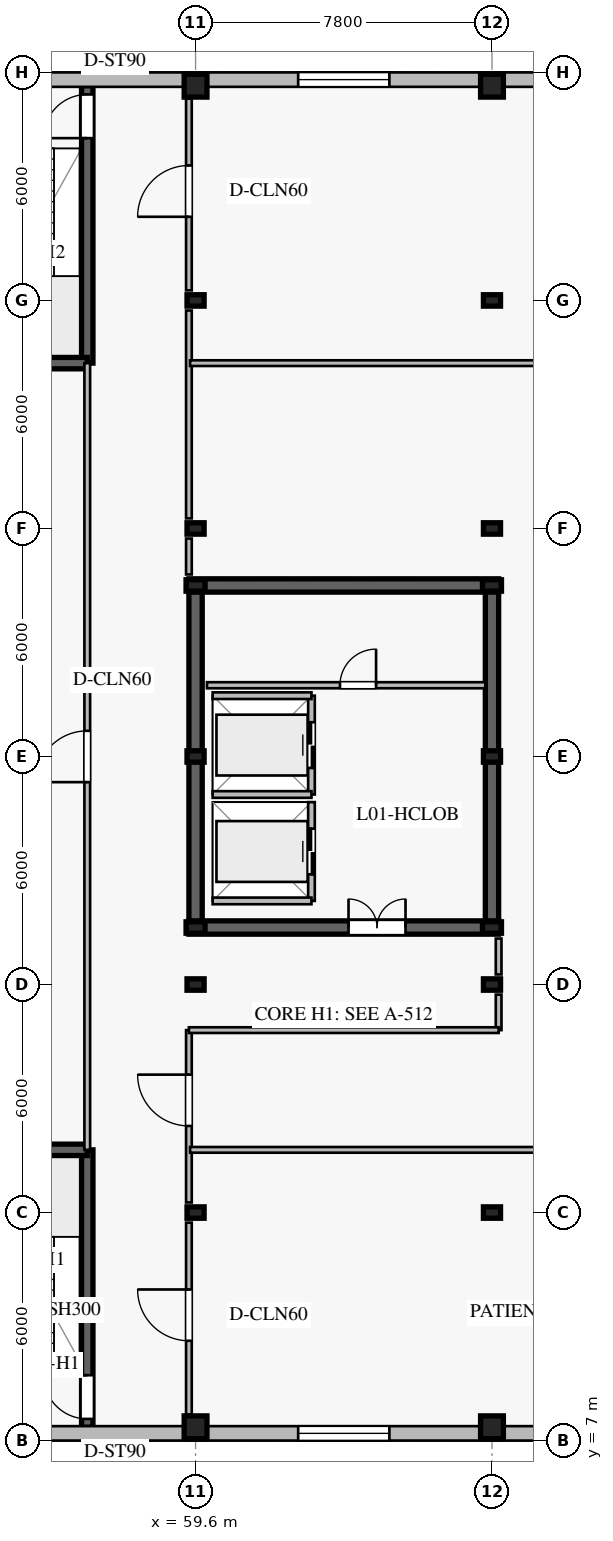
"""IFC4 building model, lengths in metres.
Left out: names, types, materials, properties, quantities, classifications, styles, units other than length and angle.
Written with IfcOpenShell. Run it as: python <this file> out.ifc"""

import sys

from ifc_helpers import new_model, si_unit, direction, frame, frame_2d, origin, origin_2d, place, context, subcontext, project, spatial, rectangle, i_section, extrude, element, fill, save


model = new_model("IFC4")
c1 = context("Model", 3, precision=1e-05, world=origin(), true_north=direction((0.0, 1.0)))
c2 = subcontext(c1, "Body", "Model", "MODEL_VIEW")
j1 = project(units=[si_unit("LENGTHUNIT", "METRE"), si_unit("PLANEANGLEUNIT", "RADIAN")], contexts=[c1])
p1 = place(None, origin())
s1 = spatial("IfcSite", under=j1, at=p1, CompositionType="ELEMENT")
p2 = place(p1, origin())
s2 = spatial("IfcBuilding", under=s1, at=p2, CompositionType="ELEMENT")
p3 = place(p2, frame((0.0, 0.0, 5.2)))
s3 = spatial("IfcBuildingStorey", under=s2, at=p3, CompositionType="ELEMENT", Elevation=5.2)
p4 = place(p3, frame((59.425, 20.5, 0.0), z_axis=(0.0, 0.0, 1.0), x_axis=(1.0, 0.0, 0.0)))
e1 = element("IfcWall", 1, at=p4, inside=s3, PredefinedType="SHEAR", context=c2, shape_type="SweptSolid", body=[
    extrude(rectangle(XDim=8.15, YDim=0.35, at=frame_2d((4.075, 0.0))), origin(), (0.0, 0.0, 1.0), 4.34),
])
p5 = place(p4, frame((4.2, 0.0, 0.0)))
e2 = element("IfcOpeningElement", 2, at=p5, cuts=e1, PredefinedType="OPENING", context=c2, shape_type="SweptSolid", body=[
    extrude(rectangle(XDim=1.5, YDim=2.2, at=frame_2d((0.75, 1.1))), frame((0.0, 0.185, 0.0), z_axis=(0.0, -1.0, 0.0), x_axis=(1.0, 0.0, 0.0)), (0.0, 0.0, 1.0), 0.37),
])
p6 = place(p3, frame((67.575, 29.5, 0.0), z_axis=(0.0, 0.0, 1.0), x_axis=(-1.0, 0.0, 0.0)))
e3 = element("IfcWall", 3, at=p6, inside=s3, PredefinedType="SHEAR", context=c2, shape_type="SweptSolid", body=[
    extrude(rectangle(XDim=8.15, YDim=0.35, at=frame_2d((4.075, 0.0))), origin(), (0.0, 0.0, 1.0), 4.34),
])
for number, where, z_axis, x_axis in (
    (4, (59.6, 29.325, 0.0), (0.0, 0.0, 1.0), (0.0, -1.0, 0.0)),
    (5, (67.4, 20.675, 0.0), (0.0, 0.0, 1.0), (0.0, 1.0, 0.0)),
):
    element("IfcWall", number, at=place(p3, frame(where, z_axis=z_axis, x_axis=x_axis)), inside=s3, PredefinedType="SHEAR", context=c2, shape_type="SweptSolid", body=[
        extrude(rectangle(XDim=8.65, YDim=0.35, at=frame_2d((4.325, 0.0))), origin(), (0.0, 0.0, 1.0), 4.34),
    ])
for number, where, z_axis, x_axis in (
    (6, (59.6, 20.5, 0.0), (0.0, 0.0, 1.0), (1.0, 0.0, 0.0)),
    (7, (67.4, 20.5, 0.0), (0.0, 0.0, 1.0), (1.0, 0.0, 0.0)),
    (8, (67.4, 29.5, 0.0), (0.0, 0.0, 1.0), (1.0, 0.0, 0.0)),
    (9, (59.6, 29.5, 0.0), (0.0, 0.0, 1.0), (1.0, 0.0, 0.0)),
):
    element("IfcColumn", number, at=place(p3, frame(where, z_axis=z_axis, x_axis=x_axis)), inside=s3, PredefinedType="COLUMN", context=c2, shape_type="SweptSolid", body=[
        extrude(i_section(OverallWidth=0.3, OverallDepth=0.5, WebThickness=0.014, FlangeThickness=0.028, at=origin_2d()), origin(), (0.0, 0.0, 1.0), 4.6),
    ])
p7 = place(p3, frame((56.75, 7.35, 0.0), z_axis=(0.0, 0.0, 1.0), x_axis=(0.0, 1.0, 0.0)))
e10 = element("IfcWall", 10, at=p7, inside=s3, PredefinedType="SOLIDWALL", context=c2, shape_type="SweptSolid", body=[
    extrude(rectangle(XDim=7.3, YDim=0.3, at=frame_2d((3.65, 0.0))), origin(), (0.0, 0.0, 1.0), 4.34),
])
p8 = place(p7, frame((0.22, 0.0, 0.0)))
e11 = element("IfcOpeningElement", 11, at=p8, cuts=e10, PredefinedType="OPENING", context=c2, shape_type="SweptSolid", body=[
    extrude(rectangle(XDim=1.15, YDim=2.2, at=frame_2d((0.575, 1.1))), frame((0.0, 0.16, 0.0), z_axis=(0.0, -1.0, 0.0), x_axis=(1.0, 0.0, 0.0)), (0.0, 0.0, 1.0), 0.32),
])
p9 = place(p3, frame((53.4, 14.65, 0.0), z_axis=(0.0, 0.0, 1.0), x_axis=(1.0, 0.0, 0.0)))
e12 = element("IfcWall", 12, at=p9, inside=s3, PredefinedType="SOLIDWALL", context=c2, shape_type="SweptSolid", body=[
    extrude(rectangle(XDim=3.35, YDim=0.3, at=frame_2d((1.675, 0.0))), origin(), (0.0, 0.0, 1.0), 4.34),
])
p10 = place(p3, frame((56.75, 35.35, 0.0), z_axis=(0.0, 0.0, 1.0), x_axis=(0.0, 1.0, 0.0)))
e13 = element("IfcWall", 13, at=p10, inside=s3, PredefinedType="SOLIDWALL", context=c2, shape_type="SweptSolid", body=[
    extrude(rectangle(XDim=7.3, YDim=0.3, at=frame_2d((3.65, 0.0))), origin(), (0.0, 0.0, 1.0), 4.34),
])
p11 = place(p10, frame((5.92, 0.0, 0.0)))
e14 = element("IfcOpeningElement", 14, at=p11, cuts=e13, PredefinedType="OPENING", context=c2, shape_type="SweptSolid", body=[
    extrude(rectangle(XDim=1.15, YDim=2.2, at=frame_2d((0.575, 1.1))), frame((0.0, 0.16, 0.0), z_axis=(0.0, -1.0, 0.0), x_axis=(1.0, 0.0, 0.0)), (0.0, 0.0, 1.0), 0.32),
])
p12 = place(p3, frame((53.4, 35.35, 0.0), z_axis=(0.0, 0.0, 1.0), x_axis=(1.0, 0.0, 0.0)))
e15 = element("IfcWall", 15, at=p12, inside=s3, PredefinedType="SOLIDWALL", context=c2, shape_type="SweptSolid", body=[
    extrude(rectangle(XDim=3.35, YDim=0.3, at=frame_2d((1.675, 0.0))), origin(), (0.0, 0.0, 1.0), 4.34),
])
p13 = place(p3, frame((59.6, 7.35, 0.0), z_axis=(0.0, 0.0, 1.0), x_axis=(1.0, 0.0, 0.0)))
e16 = element("IfcColumn", 16, at=p13, inside=s3, PredefinedType="COLUMN", context=c2, shape_type="SweptSolid", body=[
    extrude(rectangle(XDim=0.6, YDim=0.6, at=origin_2d()), origin(), (0.0, 0.0, 1.0), 4.6),
])
for number, where, z_axis, x_axis in (
    (17, (59.6, 13.0, 0.0), (0.0, 0.0, 1.0), (1.0, 0.0, 0.0)),
    (18, (59.6, 19.0, 0.0), (0.0, 0.0, 1.0), (1.0, 0.0, 0.0)),
    (19, (59.6, 25.0, 0.0), (0.0, 0.0, 1.0), (1.0, 0.0, 0.0)),
    (20, (59.6, 31.0, 0.0), (0.0, 0.0, 1.0), (1.0, 0.0, 0.0)),
    (21, (59.6, 37.0, 0.0), (0.0, 0.0, 1.0), (1.0, 0.0, 0.0)),
):
    element("IfcColumn", number, at=place(p3, frame(where, z_axis=z_axis, x_axis=x_axis)), inside=s3, PredefinedType="COLUMN", context=c2, shape_type="SweptSolid", body=[
        extrude(i_section(OverallWidth=0.3, OverallDepth=0.45, WebThickness=0.014, FlangeThickness=0.026, at=origin_2d()), origin(), (0.0, 0.0, 1.0), 4.6),
    ])
for number, where, z_axis, x_axis in (
    (22, (59.6, 42.65, 0.0), (0.0, 0.0, 1.0), (1.0, 0.0, 0.0)),
    (23, (67.4, 7.35, 0.0), (0.0, 0.0, 1.0), (1.0, 0.0, 0.0)),
):
    element("IfcColumn", number, at=place(p3, frame(where, z_axis=z_axis, x_axis=x_axis)), inside=s3, PredefinedType="COLUMN", context=c2, shape_type="SweptSolid", body=[
        extrude(rectangle(XDim=0.6, YDim=0.6, at=origin_2d()), origin(), (0.0, 0.0, 1.0), 4.6),
    ])
for number, where, z_axis, x_axis in (
    (24, (67.4, 13.0, 0.0), (0.0, 0.0, 1.0), (1.0, 0.0, 0.0)),
    (25, (67.4, 19.0, 0.0), (0.0, 0.0, 1.0), (1.0, 0.0, 0.0)),
    (26, (67.4, 25.0, 0.0), (0.0, 0.0, 1.0), (1.0, 0.0, 0.0)),
    (27, (67.4, 31.0, 0.0), (0.0, 0.0, 1.0), (1.0, 0.0, 0.0)),
    (28, (67.4, 37.0, 0.0), (0.0, 0.0, 1.0), (1.0, 0.0, 0.0)),
):
    element("IfcColumn", number, at=place(p3, frame(where, z_axis=z_axis, x_axis=x_axis)), inside=s3, PredefinedType="COLUMN", context=c2, shape_type="SweptSolid", body=[
        extrude(i_section(OverallWidth=0.3, OverallDepth=0.45, WebThickness=0.014, FlangeThickness=0.026, at=origin_2d()), origin(), (0.0, 0.0, 1.0), 4.6),
    ])
p14 = place(p3, frame((67.4, 42.65, 0.0), z_axis=(0.0, 0.0, 1.0), x_axis=(1.0, 0.0, 0.0)))
e29 = element("IfcColumn", 29, at=p14, inside=s3, PredefinedType="COLUMN", context=c2, shape_type="SweptSolid", body=[
    extrude(rectangle(XDim=0.6, YDim=0.6, at=origin_2d()), origin(), (0.0, 0.0, 1.0), 4.6),
])
p15 = place(p3, frame((75.0, 7.19, 0.0), z_axis=(0.0, 0.0, 1.0), x_axis=(-1.0, 0.0, 0.0)))
e30 = element("IfcWall", 30, at=p15, inside=s3, PredefinedType="STANDARD", context=c2, shape_type="SweptSolid", body=[
    extrude(rectangle(XDim=23.0, YDim=0.38, at=frame_2d((11.5, 0.0))), origin(), (0.0, 0.0, 1.0), 4.34),
])
p16 = place(p15, frame((10.3, 0.0, 0.95)))
e31 = element("IfcOpeningElement", 31, at=p16, cuts=e30, PredefinedType="OPENING", context=c2, shape_type="SweptSolid", body=[
    extrude(rectangle(XDim=2.4, YDim=1.8, at=frame_2d((1.2, 0.9))), frame((0.0, 0.2, 0.0), z_axis=(0.0, -1.0, 0.0), x_axis=(1.0, 0.0, 0.0)), (0.0, 0.0, 1.0), 0.4),
])
p17 = place(p3, frame((52.0, 42.81, 0.0), z_axis=(0.0, 0.0, 1.0), x_axis=(1.0, 0.0, 0.0)))
e32 = element("IfcWall", 32, at=p17, inside=s3, PredefinedType="STANDARD", context=c2, shape_type="SweptSolid", body=[
    extrude(rectangle(XDim=23.0, YDim=0.38, at=frame_2d((11.5, 0.0))), origin(), (0.0, 0.0, 1.0), 4.34),
])
p18 = place(p17, frame((10.3, 0.0, 0.95)))
e33 = element("IfcOpeningElement", 33, at=p18, cuts=e32, PredefinedType="OPENING", context=c2, shape_type="SweptSolid", body=[
    extrude(rectangle(XDim=2.4, YDim=1.8, at=frame_2d((1.2, 0.9))), frame((0.0, 0.2, 0.0), z_axis=(0.0, -1.0, 0.0), x_axis=(1.0, 0.0, 0.0)), (0.0, 0.0, 1.0), 0.4),
])
p19 = place(p3, frame((62.65, 21.2, 0.0), z_axis=(0.0, 0.0, 1.0), x_axis=(0.0, 1.0, 0.0)))
e34 = element("IfcWall", 34, at=p19, inside=s3, PredefinedType="PARTITIONING", context=c2, shape_type="SweptSolid", body=[
    extrude(rectangle(XDim=2.6, YDim=0.175, at=frame_2d((1.3, 0.0))), origin(), (0.0, 0.0, 1.0), 4.34),
])
p20 = place(p19, frame((0.7, 0.0, 0.0)))
e35 = element("IfcOpeningElement", 35, at=p20, cuts=e34, PredefinedType="OPENING", context=c2, shape_type="SweptSolid", body=[
    extrude(rectangle(XDim=1.2, YDim=2.2, at=frame_2d((0.6, 1.1))), frame((0.0, 0.098, 0.0), z_axis=(0.0, -1.0, 0.0), x_axis=(1.0, 0.0, 0.0)), (0.0, 0.0, 1.0), 0.195),
])
p21 = place(p3, frame((60.05, 21.2, 0.0), z_axis=(0.0, 0.0, 1.0), x_axis=(1.0, 0.0, 0.0)))
e36 = element("IfcWall", 36, at=p21, inside=s3, PredefinedType="PARTITIONING", context=c2, shape_type="SweptSolid", body=[
    extrude(rectangle(XDim=2.6, YDim=0.175, at=frame_2d((1.3, 0.0))), origin(), (0.0, 0.0, 1.0), 4.34),
])
p22 = place(p3, frame((62.65, 24.0, 0.0), z_axis=(0.0, 0.0, 1.0), x_axis=(0.0, 1.0, 0.0)))
e37 = element("IfcWall", 37, at=p22, inside=s3, PredefinedType="PARTITIONING", context=c2, shape_type="SweptSolid", body=[
    extrude(rectangle(XDim=2.6, YDim=0.175, at=frame_2d((1.3, 0.0))), origin(), (0.0, 0.0, 1.0), 3.98),
])
p23 = place(p22, frame((0.7, 0.0, 0.0)))
e38 = element("IfcOpeningElement", 38, at=p23, cuts=e37, PredefinedType="OPENING", context=c2, shape_type="SweptSolid", body=[
    extrude(rectangle(XDim=1.2, YDim=2.2, at=frame_2d((0.6, 1.1))), frame((0.0, 0.098, 0.0), z_axis=(0.0, -1.0, 0.0), x_axis=(1.0, 0.0, 0.0)), (0.0, 0.0, 1.0), 0.195),
])
for number, where, z_axis, x_axis in (
    (39, (60.05, 24.0, 0.0), (0.0, 0.0, 1.0), (1.0, 0.0, 0.0)),
    (40, (60.05, 26.6, 0.0), (0.0, 0.0, 1.0), (1.0, 0.0, 0.0)),
):
    element("IfcWall", number, at=place(p3, frame(where, z_axis=z_axis, x_axis=x_axis)), inside=s3, PredefinedType="PARTITIONING", context=c2, shape_type="SweptSolid", body=[
        extrude(rectangle(XDim=2.6, YDim=0.175, at=frame_2d((1.3, 0.0))), origin(), (0.0, 0.0, 1.0), 4.34),
    ])
p24 = place(p3, frame((59.9, 26.875, 0.0), z_axis=(0.0, 0.0, 1.0), x_axis=(1.0, 0.0, 0.0)))
e41 = element("IfcWall", 41, at=p24, inside=s3, PredefinedType="PLUMBINGWALL", context=c2, shape_type="SweptSolid", body=[
    extrude(rectangle(XDim=7.325, YDim=0.16, at=frame_2d((3.663, 0.0))), origin(), (0.0, 0.0, 1.0), 3.98),
])
p25 = place(p24, frame((3.5, 0.0, 0.0)))
e42 = element("IfcOpeningElement", 42, at=p25, cuts=e41, PredefinedType="OPENING", context=c2, shape_type="SweptSolid", body=[
    extrude(rectangle(XDim=0.95, YDim=2.1, at=frame_2d((0.475, 1.05))), frame((0.0, 0.09, 0.0), z_axis=(0.0, -1.0, 0.0), x_axis=(1.0, 0.0, 0.0)), (0.0, 0.0, 1.0), 0.18),
])
p26 = place(p3, frame((56.75, 14.65, 0.0), z_axis=(0.0, 0.0, 1.0), x_axis=(0.0, 1.0, 0.0)))
e43 = element("IfcWall", 43, at=p26, inside=s3, PredefinedType="PARTITIONING", context=c2, shape_type="SweptSolid", body=[
    extrude(rectangle(XDim=20.7, YDim=0.15, at=frame_2d((10.35, 0.0))), origin(), (0.0, 0.0, 1.0), 4.34),
])
p27 = place(p26, frame((9.675, 0.0, 0.0)))
e44 = element("IfcOpeningElement", 44, at=p27, cuts=e43, PredefinedType="OPENING", context=c2, shape_type="SweptSolid", body=[
    extrude(rectangle(XDim=1.35, YDim=2.2, at=frame_2d((0.675, 1.1))), frame((0.0, 0.085, 0.0), z_axis=(0.0, -1.0, 0.0), x_axis=(1.0, 0.0, 0.0)), (0.0, 0.0, 1.0), 0.17),
])
p28 = place(p3, frame((59.425, 7.69, 0.0), z_axis=(0.0, 0.0, 1.0), x_axis=(0.0, 1.0, 0.0)))
e45 = element("IfcWall", 45, at=p28, inside=s3, PredefinedType="PARTITIONING", context=c2, shape_type="SweptSolid", body=[
    extrude(rectangle(XDim=5.045, YDim=0.15, at=frame_2d((2.522, 0.0))), origin(), (0.0, 0.0, 1.0), 3.98),
])
p29 = place(p28, frame((1.936, 0.0, 0.0)))
e46 = element("IfcOpeningElement", 46, at=p29, cuts=e45, PredefinedType="OPENING", context=c2, shape_type="SweptSolid", body=[
    extrude(rectangle(XDim=1.35, YDim=2.2, at=frame_2d((0.675, 1.1))), frame((0.0, 0.085, 0.0), z_axis=(0.0, -1.0, 0.0), x_axis=(1.0, 0.0, 0.0)), (0.0, 0.0, 1.0), 0.17),
])
p30 = place(p3, frame((59.425, 13.265, 0.0), z_axis=(0.0, 0.0, 1.0), x_axis=(0.0, 1.0, 0.0)))
e47 = element("IfcWall", 47, at=p30, inside=s3, PredefinedType="PARTITIONING", context=c2, shape_type="SweptSolid", body=[
    extrude(rectangle(XDim=4.535, YDim=0.15, at=frame_2d((2.268, 0.0))), origin(), (0.0, 0.0, 1.0), 3.98),
])
p31 = place(p30, frame((2.014, 0.0, 0.0)))
e48 = element("IfcOpeningElement", 48, at=p31, cuts=e47, PredefinedType="OPENING", context=c2, shape_type="SweptSolid", body=[
    extrude(rectangle(XDim=1.35, YDim=2.2, at=frame_2d((0.675, 1.1))), frame((0.0, 0.085, 0.0), z_axis=(0.0, -1.0, 0.0), x_axis=(1.0, 0.0, 0.0)), (0.0, 0.0, 1.0), 0.17),
])
p32 = place(p3, frame((59.425, 29.79, 0.0), z_axis=(0.0, 0.0, 1.0), x_axis=(0.0, 1.0, 0.0)))
e49 = element("IfcWall", 49, at=p32, inside=s3, PredefinedType="PARTITIONING", context=c2, shape_type="SweptSolid", body=[
    extrude(rectangle(XDim=0.945, YDim=0.15, at=frame_2d((0.473, 0.0))), origin(), (0.0, 0.0, 1.0), 3.98),
])
p33 = place(p3, frame((59.425, 31.265, 0.0), z_axis=(0.0, 0.0, 1.0), x_axis=(0.0, 1.0, 0.0)))
e50 = element("IfcWall", 50, at=p33, inside=s3, PredefinedType="PARTITIONING", context=c2, shape_type="SweptSolid", body=[
    extrude(rectangle(XDim=5.47, YDim=0.15, at=frame_2d((2.735, 0.0))), origin(), (0.0, 0.0, 1.0), 3.98),
])
p34 = place(p3, frame((59.425, 37.265, 0.0), z_axis=(0.0, 0.0, 1.0), x_axis=(0.0, 1.0, 0.0)))
e51 = element("IfcWall", 51, at=p34, inside=s3, PredefinedType="PARTITIONING", context=c2, shape_type="SweptSolid", body=[
    extrude(rectangle(XDim=5.045, YDim=0.15, at=frame_2d((2.522, 0.0))), origin(), (0.0, 0.0, 1.0), 3.98),
])
p35 = place(p34, frame((1.936, 0.0, 0.0)))
e52 = element("IfcOpeningElement", 52, at=p35, cuts=e51, PredefinedType="OPENING", context=c2, shape_type="SweptSolid", body=[
    extrude(rectangle(XDim=1.35, YDim=2.2, at=frame_2d((0.675, 1.1))), frame((0.0, 0.085, 0.0), z_axis=(0.0, -1.0, 0.0), x_axis=(1.0, 0.0, 0.0)), (0.0, 0.0, 1.0), 0.17),
])
p36 = place(p3, frame((67.575, 17.8, 0.0), z_axis=(0.0, 0.0, 1.0), x_axis=(0.0, 1.0, 0.0)))
e53 = element("IfcWall", 53, at=p36, inside=s3, PredefinedType="PARTITIONING", context=c2, shape_type="SweptSolid", body=[
    extrude(rectangle(XDim=0.935, YDim=0.15, at=frame_2d((0.468, 0.0))), origin(), (0.0, 0.0, 1.0), 3.98),
])
p37 = place(p3, frame((67.575, 19.265, 0.0), z_axis=(0.0, 0.0, 1.0), x_axis=(0.0, 1.0, 0.0)))
e54 = element("IfcWall", 54, at=p37, inside=s3, PredefinedType="PARTITIONING", context=c2, shape_type="SweptSolid", body=[
    extrude(rectangle(XDim=0.945, YDim=0.15, at=frame_2d((0.473, 0.0))), origin(), (0.0, 0.0, 1.0), 3.98),
])
p38 = place(p3, frame((59.425, 17.8, 0.0), z_axis=(0.0, 0.0, 1.0), x_axis=(1.0, 0.0, 0.0)))
e55 = element("IfcWall", 55, at=p38, inside=s3, PredefinedType="PARTITIONING", context=c2, shape_type="SweptSolid", body=[
    extrude(rectangle(XDim=8.15, YDim=0.15, at=frame_2d((4.075, 0.0))), origin(), (0.0, 0.0, 1.0), 3.98),
])
for number, where, z_axis, x_axis in (
    (56, (59.455, 14.65, 0.0), (0.0, 0.0, 1.0), (1.0, 0.0, 0.0)),
    (57, (59.455, 35.35, 0.0), (0.0, 0.0, 1.0), (1.0, 0.0, 0.0)),
):
    element("IfcWall", number, at=place(p3, frame(where, z_axis=z_axis, x_axis=x_axis)), inside=s3, PredefinedType="PARTITIONING", context=c2, shape_type="SweptSolid", body=[
        extrude(rectangle(XDim=15.165, YDim=0.15, at=frame_2d((7.583, 0.0))), origin(), (0.0, 0.0, 1.0), 3.98),
    ])
p39 = place(p16, origin())
e58 = element("IfcWindow", 58, at=p39, inside=s3, PartitioningType="TRIPLE_PANEL_VERTICAL", PredefinedType="WINDOW", context=c2, shape_type="SweptSolid", body=[
    extrude(rectangle(XDim=2.4, YDim=1.8, at=frame_2d((1.2, 0.9))), frame((0.0, 0.03, 0.0), z_axis=(0.0, -1.0, 0.0), x_axis=(1.0, 0.0, 0.0)), (0.0, 0.0, 1.0), 0.06),
])
fill(e31, e58)
p40 = place(p18, origin())
e59 = element("IfcWindow", 59, at=p40, inside=s3, PartitioningType="TRIPLE_PANEL_VERTICAL", PredefinedType="WINDOW", context=c2, shape_type="SweptSolid", body=[
    extrude(rectangle(XDim=2.4, YDim=1.8, at=frame_2d((1.2, 0.9))), frame((0.0, 0.03, 0.0), z_axis=(0.0, -1.0, 0.0), x_axis=(1.0, 0.0, 0.0)), (0.0, 0.0, 1.0), 0.06),
])
fill(e33, e59)
p41 = place(p20, origin())
e60 = element("IfcDoor", 60, at=p41, inside=s3, OperationType="DOUBLE_DOOR_SLIDING", PredefinedType="DOOR", context=c2, shape_type="SweptSolid", body=[
    extrude(rectangle(XDim=1.2, YDim=2.2, at=frame_2d((0.6, 1.1))), frame((0.0, 0.025, 0.0), z_axis=(0.0, -1.0, 0.0), x_axis=(1.0, 0.0, 0.0)), (0.0, 0.0, 1.0), 0.05),
])
fill(e35, e60)
p42 = place(p23, origin())
e61 = element("IfcDoor", 61, at=p42, inside=s3, OperationType="DOUBLE_DOOR_SLIDING", PredefinedType="DOOR", context=c2, shape_type="SweptSolid", body=[
    extrude(rectangle(XDim=1.2, YDim=2.2, at=frame_2d((0.6, 1.1))), frame((0.0, 0.025, 0.0), z_axis=(0.0, -1.0, 0.0), x_axis=(1.0, 0.0, 0.0)), (0.0, 0.0, 1.0), 0.05),
])
fill(e38, e61)
p43 = place(p8, origin())
e62 = element("IfcDoor", 62, at=p43, inside=s3, OperationType="SINGLE_SWING_RIGHT", PredefinedType="DOOR", context=c2, shape_type="SweptSolid", body=[
    extrude(rectangle(XDim=1.15, YDim=2.2, at=frame_2d((0.575, 1.1))), frame((0.0, 0.025, 0.0), z_axis=(0.0, -1.0, 0.0), x_axis=(1.0, 0.0, 0.0)), (0.0, 0.0, 1.0), 0.05),
])
fill(e11, e62)
p44 = place(p11, origin())
e63 = element("IfcDoor", 63, at=p44, inside=s3, OperationType="SINGLE_SWING_LEFT", PredefinedType="DOOR", context=c2, shape_type="SweptSolid", body=[
    extrude(rectangle(XDim=1.15, YDim=2.2, at=frame_2d((0.575, 1.1))), frame((0.0, 0.025, 0.0), z_axis=(0.0, -1.0, 0.0), x_axis=(1.0, 0.0, 0.0)), (0.0, 0.0, 1.0), 0.05),
])
fill(e14, e63)
p45 = place(p5, origin())
e64 = element("IfcDoor", 64, at=p45, inside=s3, OperationType="DOUBLE_DOOR_SINGLE_SWING", PredefinedType="DOOR", context=c2, shape_type="SweptSolid", body=[
    extrude(rectangle(XDim=1.5, YDim=2.2, at=frame_2d((0.75, 1.1))), frame((0.0, 0.025, 0.0), z_axis=(0.0, -1.0, 0.0), x_axis=(1.0, 0.0, 0.0)), (0.0, 0.0, 1.0), 0.05),
])
fill(e2, e64)
p46 = place(p25, origin())
e65 = element("IfcDoor", 65, at=p46, inside=s3, OperationType="SINGLE_SWING_RIGHT", PredefinedType="DOOR", context=c2, shape_type="SweptSolid", body=[
    extrude(rectangle(XDim=0.95, YDim=2.1, at=frame_2d((0.475, 1.05))), frame((0.0, 0.025, 0.0), z_axis=(0.0, -1.0, 0.0), x_axis=(1.0, 0.0, 0.0)), (0.0, 0.0, 1.0), 0.05),
])
fill(e42, e65)
p47 = place(p27, origin())
e66 = element("IfcDoor", 66, at=p47, inside=s3, OperationType="SINGLE_SWING_LEFT", PredefinedType="DOOR", context=c2, shape_type="SweptSolid", body=[
    extrude(rectangle(XDim=1.35, YDim=2.2, at=frame_2d((0.675, 1.1))), frame((0.0, 0.025, 0.0), z_axis=(0.0, -1.0, 0.0), x_axis=(1.0, 0.0, 0.0)), (0.0, 0.0, 1.0), 0.05),
])
fill(e44, e66)
p48 = place(p29, origin())
e67 = element("IfcDoor", 67, at=p48, inside=s3, OperationType="SINGLE_SWING_RIGHT", PredefinedType="DOOR", context=c2, shape_type="SweptSolid", body=[
    extrude(rectangle(XDim=1.35, YDim=2.2, at=frame_2d((0.675, 1.1))), frame((0.0, 0.025, 0.0), z_axis=(0.0, -1.0, 0.0), x_axis=(1.0, 0.0, 0.0)), (0.0, 0.0, 1.0), 0.05),
])
fill(e46, e67)
p49 = place(p35, origin())
e68 = element("IfcDoor", 68, at=p49, inside=s3, OperationType="SINGLE_SWING_LEFT", PredefinedType="DOOR", context=c2, shape_type="SweptSolid", body=[
    extrude(rectangle(XDim=1.35, YDim=2.2, at=frame_2d((0.675, 1.1))), frame((0.0, 0.025, 0.0), z_axis=(0.0, -1.0, 0.0), x_axis=(1.0, 0.0, 0.0)), (0.0, 0.0, 1.0), 0.05),
])
fill(e52, e68)
p50 = place(p31, origin())
e69 = element("IfcDoor", 69, at=p50, inside=s3, OperationType="SINGLE_SWING_RIGHT", PredefinedType="DOOR", context=c2, shape_type="SweptSolid", body=[
    extrude(rectangle(XDim=1.35, YDim=2.2, at=frame_2d((0.675, 1.1))), frame((0.0, 0.025, 0.0), z_axis=(0.0, -1.0, 0.0), x_axis=(1.0, 0.0, 0.0)), (0.0, 0.0, 1.0), 0.05),
])
fill(e48, e69)
save(model, sys.argv[1])
